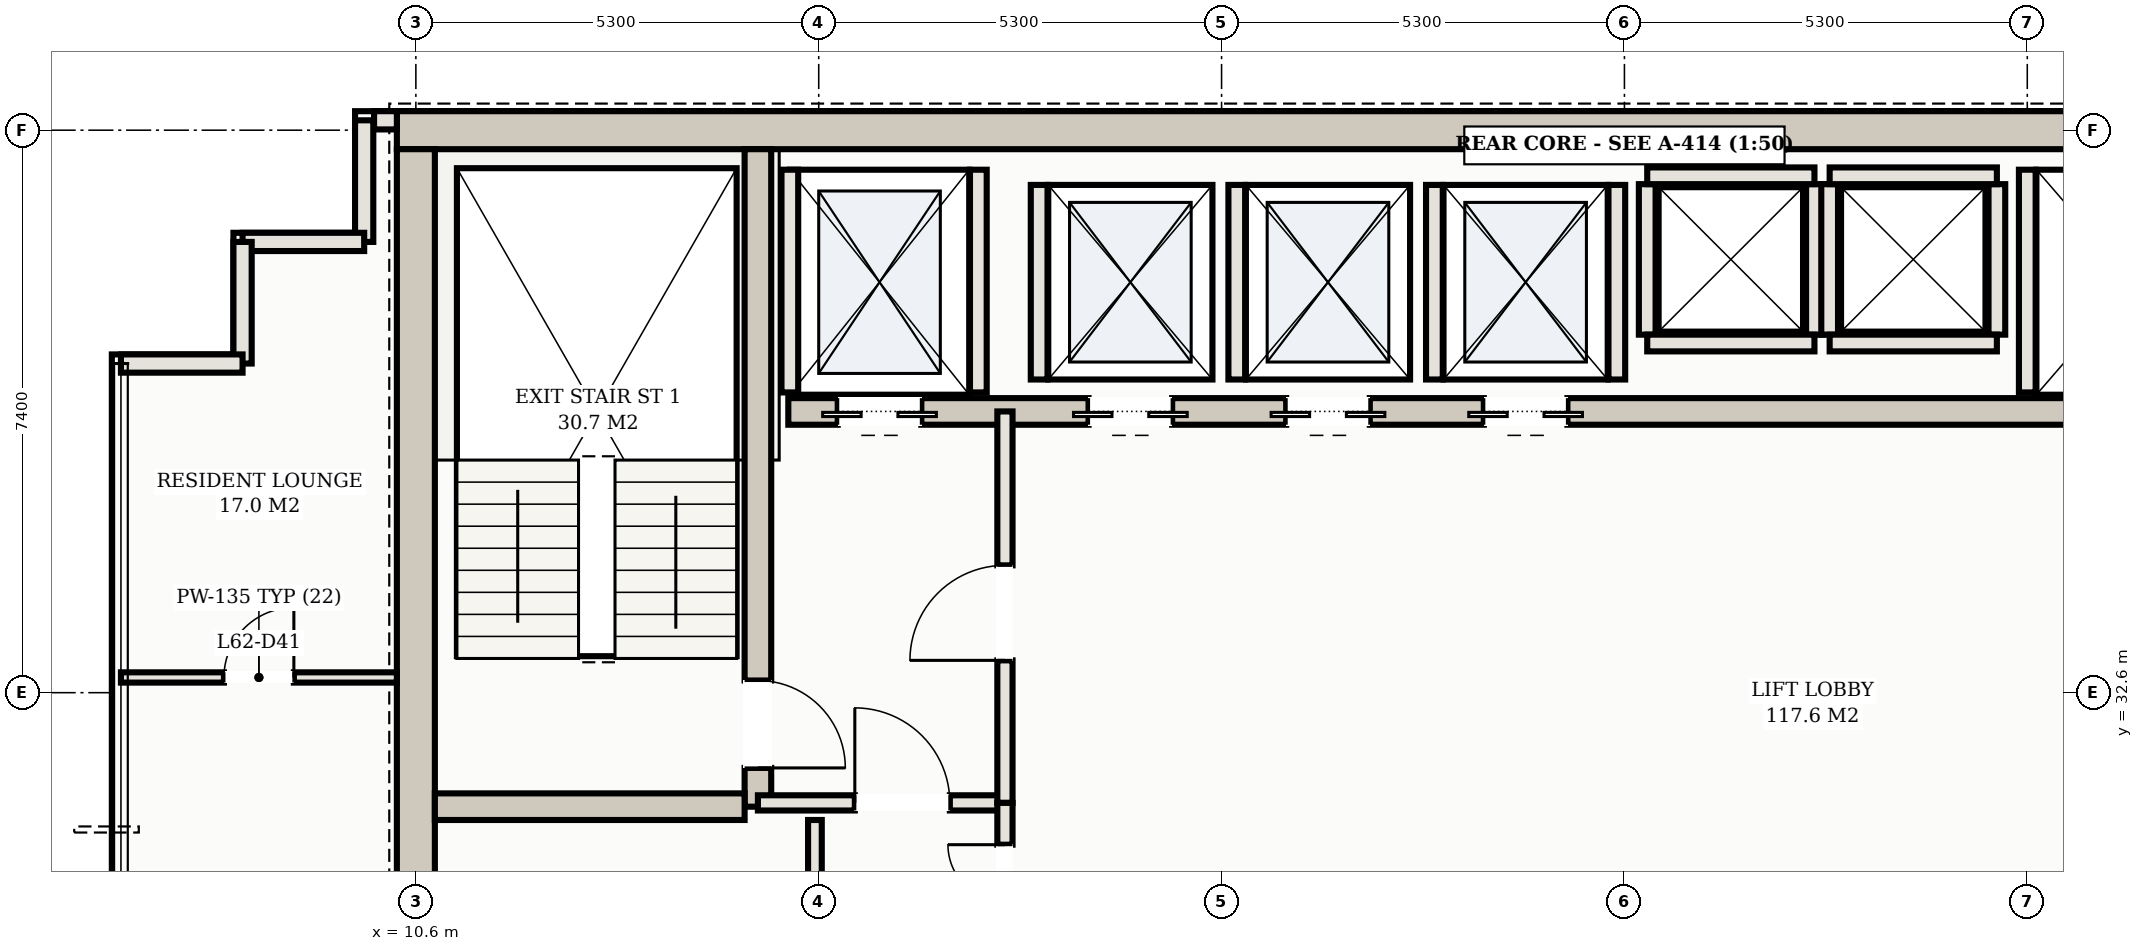
"""IFC4 building model, lengths in metres.
Left out: names, types, materials, properties, quantities, classifications, styles, units other than length and angle.
Written with IfcOpenShell. Run it as: python <this file> out.ifc"""

import sys

from ifc_helpers import new_model, si_unit, direction, frame, frame_2d, origin, place, context, subcontext, project, spatial, rectangle, extrude, element, fill, save


model = new_model("IFC4")
c1 = context("Model", 3, precision=1e-05, world=origin(), true_north=direction((0.0, 1.0)))
c2 = subcontext(c1, "Body", "Model", "MODEL_VIEW")
j1 = project(units=[si_unit("LENGTHUNIT", "METRE"), si_unit("PLANEANGLEUNIT", "RADIAN")], contexts=[c1])
p1 = place(None, origin())
s1 = spatial("IfcSite", under=j1, at=p1, CompositionType="ELEMENT")
p2 = place(p1, origin())
s2 = spatial("IfcBuilding", under=s1, at=p2, CompositionType="ELEMENT")
p3 = place(p2, frame((0.0, 0.0, 226.4)))
s3 = spatial("IfcBuildingStorey", under=s2, at=p3, CompositionType="ELEMENT", Elevation=226.4)
p4 = place(p3, frame((10.35, 40.0, 0.0), z_axis=(0.0, 0.0, 1.0), x_axis=(1.0, 0.0, 0.0)))
e1 = element("IfcWall", 1, at=p4, inside=s3, PredefinedType="SHEAR", context=c2, shape_type="SweptSolid", body=[
    extrude(rectangle(XDim=32.3, YDim=0.5, at=frame_2d((16.15, 0.0))), origin(), (0.0, 0.0, 1.0), 3.11),
])
p5 = place(p3, frame((10.6, 25.45, 0.0), z_axis=(0.0, 0.0, 1.0), x_axis=(0.0, 1.0, 0.0)))
e2 = element("IfcWall", 2, at=p5, inside=s3, PredefinedType="SHEAR", context=c2, shape_type="SweptSolid", body=[
    extrude(rectangle(XDim=14.3, YDim=0.5, at=frame_2d((7.15, 0.0))), origin(), (0.0, 0.0, 1.0), 3.11),
])
p6 = place(p3, frame((15.1, 31.1, 0.0), z_axis=(0.0, 0.0, 1.0), x_axis=(0.0, 1.0, 0.0)))
e3 = element("IfcWall", 3, at=p6, inside=s3, PredefinedType="SHEAR", context=c2, shape_type="SweptSolid", body=[
    extrude(rectangle(XDim=8.65, YDim=0.35, at=frame_2d((4.325, 0.0))), origin(), (0.0, 0.0, 1.0), 3.11),
])
p7 = place(p6, frame((0.51, 0.0, 0.0)))
e4 = element("IfcOpeningElement", 4, at=p7, cuts=e3, PredefinedType="OPENING", context=c2, shape_type="SweptSolid", body=[
    extrude(rectangle(XDim=1.15, YDim=2.2, at=frame_2d((0.575, 1.1))), frame((0.0, 0.185, 0.0), z_axis=(0.0, -1.0, 0.0), x_axis=(1.0, 0.0, 0.0)), (0.0, 0.0, 1.0), 0.37),
])
p8 = place(p3, frame((10.85, 31.1, 0.0), z_axis=(0.0, 0.0, 1.0), x_axis=(1.0, 0.0, 0.0)))
e5 = element("IfcWall", 5, at=p8, inside=s3, PredefinedType="SHEAR", context=c2, shape_type="SweptSolid", body=[
    extrude(rectangle(XDim=4.075, YDim=0.35, at=frame_2d((2.038, 0.0))), origin(), (0.0, 0.0, 1.0), 3.11),
])
p9 = place(p3, frame((15.5, 36.3, 0.0), z_axis=(0.0, 0.0, 1.0), x_axis=(1.0, 0.0, 0.0)))
e6 = element("IfcWall", 6, at=p9, inside=s3, PredefinedType="SHEAR", context=c2, shape_type="SweptSolid", body=[
    extrude(rectangle(XDim=22.0, YDim=0.35, at=frame_2d((11.0, 0.0))), origin(), (0.0, 0.0, 1.0), 3.11),
])
p10 = place(p9, frame((0.65, 0.0, 0.0)))
e7 = element("IfcOpeningElement", 7, at=p10, cuts=e6, PredefinedType="OPENING", context=c2, shape_type="SweptSolid", body=[
    extrude(rectangle(XDim=1.1, YDim=2.15, at=frame_2d((0.55, 1.075))), frame((0.0, 0.185, 0.0), z_axis=(0.0, -1.0, 0.0), x_axis=(1.0, 0.0, 0.0)), (0.0, 0.0, 1.0), 0.37),
])
p11 = place(p9, frame((20.25, 0.0, 0.0)))
e8 = element("IfcOpeningElement", 8, at=p11, cuts=e6, PredefinedType="OPENING", context=c2, shape_type="SweptSolid", body=[
    extrude(rectangle(XDim=1.1, YDim=2.15, at=frame_2d((0.55, 1.075))), frame((0.0, 0.185, 0.0), z_axis=(0.0, -1.0, 0.0), x_axis=(1.0, 0.0, 0.0)), (0.0, 0.0, 1.0), 0.37),
])
p12 = place(p9, frame((17.05, 0.0, 0.0)))
e9 = element("IfcOpeningElement", 9, at=p12, cuts=e6, PredefinedType="OPENING", context=c2, shape_type="SweptSolid", body=[
    extrude(rectangle(XDim=1.3, YDim=2.2, at=frame_2d((0.65, 1.1))), frame((0.0, 0.185, 0.0), z_axis=(0.0, -1.0, 0.0), x_axis=(1.0, 0.0, 0.0)), (0.0, 0.0, 1.0), 0.37),
])
p13 = place(p9, frame((3.95, 0.0, 0.0)))
e10 = element("IfcOpeningElement", 10, at=p13, cuts=e6, PredefinedType="OPENING", context=c2, shape_type="SweptSolid", body=[
    extrude(rectangle(XDim=1.1, YDim=2.15, at=frame_2d((0.55, 1.075))), frame((0.0, 0.185, 0.0), z_axis=(0.0, -1.0, 0.0), x_axis=(1.0, 0.0, 0.0)), (0.0, 0.0, 1.0), 0.37),
])
p14 = place(p9, frame((6.55, 0.0, 0.0)))
e11 = element("IfcOpeningElement", 11, at=p14, cuts=e6, PredefinedType="OPENING", context=c2, shape_type="SweptSolid", body=[
    extrude(rectangle(XDim=1.1, YDim=2.15, at=frame_2d((0.55, 1.075))), frame((0.0, 0.185, 0.0), z_axis=(0.0, -1.0, 0.0), x_axis=(1.0, 0.0, 0.0)), (0.0, 0.0, 1.0), 0.37),
])
p15 = place(p9, frame((9.15, 0.0, 0.0)))
e12 = element("IfcOpeningElement", 12, at=p15, cuts=e6, PredefinedType="OPENING", context=c2, shape_type="SweptSolid", body=[
    extrude(rectangle(XDim=1.1, YDim=2.15, at=frame_2d((0.55, 1.075))), frame((0.0, 0.185, 0.0), z_axis=(0.0, -1.0, 0.0), x_axis=(1.0, 0.0, 0.0)), (0.0, 0.0, 1.0), 0.37),
])
for number, where, z_axis, x_axis in (
    (13, (15.52, 36.55, 0.0), (0.0, 0.0, 1.0), (0.0, 1.0, 0.0)),
    (14, (18.0, 36.55, 0.0), (0.0, 0.0, 1.0), (0.0, 1.0, 0.0)),
    (15, (31.8, 36.55, 0.0), (0.0, 0.0, 1.0), (0.0, 1.0, 0.0)),
):
    element("IfcWall", number, at=place(p3, frame(where, z_axis=z_axis, x_axis=x_axis)), inside=s3, PredefinedType="SOLIDWALL", context=c2, shape_type="SweptSolid", body=[
        extrude(rectangle(XDim=2.93, YDim=0.22, at=frame_2d((1.465, 0.0))), origin(), (0.0, 0.0, 1.0), 3.11),
    ])
for number, where, z_axis, x_axis in (
    (16, (18.8, 36.72, 0.0), (0.0, 0.0, 1.0), (0.0, 1.0, 0.0)),
    (17, (21.4, 36.72, 0.0), (0.0, 0.0, 1.0), (0.0, 1.0, 0.0)),
    (18, (24.0, 36.72, 0.0), (0.0, 0.0, 1.0), (0.0, 1.0, 0.0)),
    (19, (26.4, 36.72, 0.0), (0.0, 0.0, 1.0), (0.0, 1.0, 0.0)),
):
    element("IfcWall", number, at=place(p3, frame(where, z_axis=z_axis, x_axis=x_axis)), inside=s3, PredefinedType="SOLIDWALL", context=c2, shape_type="SweptSolid", body=[
        extrude(rectangle(XDim=2.56, YDim=0.22, at=frame_2d((1.28, 0.0))), origin(), (0.0, 0.0, 1.0), 3.11),
    ])
for number, where, z_axis, x_axis in (
    (20, (26.8, 37.31, 0.0), (0.0, 0.0, 1.0), (0.0, 1.0, 0.0)),
    (21, (29.0, 37.31, 0.0), (0.0, 0.0, 1.0), (0.0, 1.0, 0.0)),
):
    element("IfcWall", number, at=place(p3, frame(where, z_axis=z_axis, x_axis=x_axis)), inside=s3, PredefinedType="SOLIDWALL", context=c2, shape_type="SweptSolid", body=[
        extrude(rectangle(XDim=1.98, YDim=0.22, at=frame_2d((0.99, 0.0))), origin(), (0.0, 0.0, 1.0), 3.11),
    ])
for number, where, z_axis, x_axis in (
    (22, (26.8, 39.4, 0.0), (0.0, 0.0, 1.0), (1.0, 0.0, 0.0)),
    (23, (26.8, 37.2, 0.0), (0.0, 0.0, 1.0), (1.0, 0.0, 0.0)),
):
    element("IfcWall", number, at=place(p3, frame(where, z_axis=z_axis, x_axis=x_axis)), inside=s3, PredefinedType="SOLIDWALL", context=c2, shape_type="SweptSolid", body=[
        extrude(rectangle(XDim=2.2, YDim=0.22, at=frame_2d((1.1, 0.0))), origin(), (0.0, 0.0, 1.0), 3.11),
    ])
for number, where, z_axis, x_axis in (
    (24, (29.2, 37.31, 0.0), (0.0, 0.0, 1.0), (0.0, 1.0, 0.0)),
    (25, (31.4, 37.31, 0.0), (0.0, 0.0, 1.0), (0.0, 1.0, 0.0)),
):
    element("IfcWall", number, at=place(p3, frame(where, z_axis=z_axis, x_axis=x_axis)), inside=s3, PredefinedType="SOLIDWALL", context=c2, shape_type="SweptSolid", body=[
        extrude(rectangle(XDim=1.98, YDim=0.22, at=frame_2d((0.99, 0.0))), origin(), (0.0, 0.0, 1.0), 3.11),
    ])
for number, where, z_axis, x_axis in (
    (26, (29.2, 39.4, 0.0), (0.0, 0.0, 1.0), (1.0, 0.0, 0.0)),
    (27, (29.2, 37.2, 0.0), (0.0, 0.0, 1.0), (1.0, 0.0, 0.0)),
):
    element("IfcWall", number, at=place(p3, frame(where, z_axis=z_axis, x_axis=x_axis)), inside=s3, PredefinedType="SOLIDWALL", context=c2, shape_type="SweptSolid", body=[
        extrude(rectangle(XDim=2.2, YDim=0.22, at=frame_2d((1.1, 0.0))), origin(), (0.0, 0.0, 1.0), 3.11),
    ])
p16 = place(p3, frame((10.35, 40.13, 0.0), z_axis=(0.0, 0.0, 1.0), x_axis=(-1.0, 0.0, 0.0)))
e28 = element("IfcWall", 28, at=p16, inside=s3, PredefinedType="SOLIDWALL", context=c2, shape_type="SweptSolid", body=[
    extrude(rectangle(XDim=0.3, YDim=0.24, at=frame_2d((0.15, 0.0))), origin(), (0.0, 0.0, 1.0), 3.11),
])
for number, where, z_axis, x_axis in (
    (29, (9.92, 40.13, 0.0), (0.0, 0.0, 1.0), (0.0, -1.0, 0.0)),
    (30, (9.92, 38.53, 0.0), (0.0, 0.0, 1.0), (-1.0, 0.0, 0.0)),
):
    element("IfcWall", number, at=place(p3, frame(where, z_axis=z_axis, x_axis=x_axis)), inside=s3, PredefinedType="SOLIDWALL", context=c2, shape_type="SweptSolid", body=[
        extrude(rectangle(XDim=1.6, YDim=0.24, at=frame_2d((0.8, 0.0))), origin(), (0.0, 0.0, 1.0), 3.11),
    ])
for number, where, z_axis, x_axis in (
    (31, (8.32, 38.53, 0.0), (0.0, 0.0, 1.0), (0.0, -1.0, 0.0)),
    (32, (8.32, 36.93, 0.0), (0.0, 0.0, 1.0), (-1.0, 0.0, 0.0)),
):
    element("IfcWall", number, at=place(p3, frame(where, z_axis=z_axis, x_axis=x_axis)), inside=s3, PredefinedType="SOLIDWALL", context=c2, shape_type="SweptSolid", body=[
        extrude(rectangle(XDim=1.6, YDim=0.24, at=frame_2d((0.8, 0.0))), origin(), (0.0, 0.0, 1.0), 3.11),
    ])
p17 = place(p3, frame((15.1, 31.15, 0.0), z_axis=(0.0, 0.0, 1.0), x_axis=(1.0, 0.0, 0.0)))
e33 = element("IfcWall", 33, at=p17, inside=s3, PredefinedType="PARTITIONING", context=c2, shape_type="SweptSolid", body=[
    extrude(rectangle(XDim=3.25, YDim=0.2, at=frame_2d((1.625, 0.0))), origin(), (0.0, 0.0, 1.0), 2.43),
])
p18 = place(p17, frame((1.275, 0.0, 0.0)))
e34 = element("IfcOpeningElement", 34, at=p18, cuts=e33, PredefinedType="OPENING", context=c2, shape_type="SweptSolid", body=[
    extrude(rectangle(XDim=1.25, YDim=2.2, at=frame_2d((0.625, 1.1))), frame((0.0, 0.11, 0.0), z_axis=(0.0, -1.0, 0.0), x_axis=(1.0, 0.0, 0.0)), (0.0, 0.0, 1.0), 0.22),
])
p19 = place(p3, frame((18.35, 31.15, 0.0), z_axis=(0.0, 0.0, 1.0), x_axis=(0.0, 1.0, 0.0)))
e35 = element("IfcWall", 35, at=p19, inside=s3, PredefinedType="PARTITIONING", context=c2, shape_type="SweptSolid", body=[
    extrude(rectangle(XDim=5.15, YDim=0.2, at=frame_2d((2.575, 0.0))), origin(), (0.0, 0.0, 1.0), 2.43),
])
p20 = place(p19, frame((1.875, 0.0, 0.0)))
e36 = element("IfcOpeningElement", 36, at=p20, cuts=e35, PredefinedType="OPENING", context=c2, shape_type="SweptSolid", body=[
    extrude(rectangle(XDim=1.25, YDim=2.2, at=frame_2d((0.625, 1.1))), frame((0.0, 0.11, 0.0), z_axis=(0.0, -1.0, 0.0), x_axis=(1.0, 0.0, 0.0)), (0.0, 0.0, 1.0), 0.22),
])
p21 = place(p3, frame((15.85, 25.45, 0.0), z_axis=(0.0, 0.0, 1.0), x_axis=(0.0, 1.0, 0.0)))
e37 = element("IfcWall", 37, at=p21, inside=s3, PredefinedType="PARTITIONING", context=c2, shape_type="SweptSolid", body=[
    extrude(rectangle(XDim=5.475, YDim=0.18, at=frame_2d((2.738, 0.0))), origin(), (0.0, 0.0, 1.0), 2.43),
])
p22 = place(p21, frame((2.277, 0.0, 0.0)))
e38 = element("IfcOpeningElement", 38, at=p22, cuts=e37, PredefinedType="OPENING", context=c2, shape_type="SweptSolid", body=[
    extrude(rectangle(XDim=0.92, YDim=2.15, at=frame_2d((0.46, 1.075))), frame((0.0, 0.1, 0.0), z_axis=(0.0, -1.0, 0.0), x_axis=(1.0, 0.0, 0.0)), (0.0, 0.0, 1.0), 0.2),
])
p23 = place(p3, frame((18.35, 28.55, 0.0), z_axis=(0.0, 0.0, 1.0), x_axis=(0.0, 1.0, 0.0)))
e39 = element("IfcWall", 39, at=p23, inside=s3, PredefinedType="PARTITIONING", context=c2, shape_type="SweptSolid", body=[
    extrude(rectangle(XDim=2.6, YDim=0.2, at=frame_2d((1.3, 0.0))), origin(), (0.0, 0.0, 1.0), 2.43),
])
p24 = place(p23, frame((0.55, 0.0, 0.0)))
e40 = element("IfcOpeningElement", 40, at=p24, cuts=e39, PredefinedType="OPENING", context=c2, shape_type="SweptSolid", body=[
    extrude(rectangle(XDim=1.5, YDim=2.25, at=frame_2d((0.75, 1.125))), frame((0.0, 0.11, 0.0), z_axis=(0.0, -1.0, 0.0), x_axis=(1.0, 0.0, 0.0)), (0.0, 0.0, 1.0), 0.22),
])
p25 = place(p3, frame((6.72, 32.8, 0.0), z_axis=(0.0, 0.0, 1.0), x_axis=(1.0, 0.0, 0.0)))
e41 = element("IfcWall", 41, at=p25, inside=s3, PredefinedType="PARTITIONING", context=c2, shape_type="SweptSolid", body=[
    extrude(rectangle(XDim=3.63, YDim=0.135, at=frame_2d((1.815, 0.0))), origin(), (0.0, 0.0, 1.0), 2.43),
])
p26 = place(p25, frame((1.355, 0.0, 0.0)))
e42 = element("IfcOpeningElement", 42, at=p26, cuts=e41, PredefinedType="OPENING", context=c2, shape_type="SweptSolid", body=[
    extrude(rectangle(XDim=0.92, YDim=2.15, at=frame_2d((0.46, 1.075))), frame((0.0, 0.078, 0.0), z_axis=(0.0, -1.0, 0.0), x_axis=(1.0, 0.0, 0.0)), (0.0, 0.0, 1.0), 0.155),
])
p27 = place(p10, frame((1.1, 0.0, 0.0), z_axis=(0.0, 0.0, 1.0), x_axis=(-1.0, 0.0, 0.0)))
e43 = element("IfcDoor", 43, at=p27, inside=s3, OperationType="DOUBLE_DOOR_SLIDING", PredefinedType="DOOR", context=c2, shape_type="SweptSolid", body=[
    extrude(rectangle(XDim=1.1, YDim=2.15, at=frame_2d((0.55, 1.075))), frame((0.0, 0.025, 0.0), z_axis=(0.0, -1.0, 0.0), x_axis=(1.0, 0.0, 0.0)), (0.0, 0.0, 1.0), 0.05),
])
fill(e7, e43)
p28 = place(p13, frame((1.1, 0.0, 0.0), z_axis=(0.0, 0.0, 1.0), x_axis=(-1.0, 0.0, 0.0)))
e44 = element("IfcDoor", 44, at=p28, inside=s3, OperationType="DOUBLE_DOOR_SLIDING", PredefinedType="DOOR", context=c2, shape_type="SweptSolid", body=[
    extrude(rectangle(XDim=1.1, YDim=2.15, at=frame_2d((0.55, 1.075))), frame((0.0, 0.025, 0.0), z_axis=(0.0, -1.0, 0.0), x_axis=(1.0, 0.0, 0.0)), (0.0, 0.0, 1.0), 0.05),
])
fill(e10, e44)
p29 = place(p14, frame((1.1, 0.0, 0.0), z_axis=(0.0, 0.0, 1.0), x_axis=(-1.0, 0.0, 0.0)))
e45 = element("IfcDoor", 45, at=p29, inside=s3, OperationType="DOUBLE_DOOR_SLIDING", PredefinedType="DOOR", context=c2, shape_type="SweptSolid", body=[
    extrude(rectangle(XDim=1.1, YDim=2.15, at=frame_2d((0.55, 1.075))), frame((0.0, 0.025, 0.0), z_axis=(0.0, -1.0, 0.0), x_axis=(1.0, 0.0, 0.0)), (0.0, 0.0, 1.0), 0.05),
])
fill(e11, e45)
p30 = place(p15, frame((1.1, 0.0, 0.0), z_axis=(0.0, 0.0, 1.0), x_axis=(-1.0, 0.0, 0.0)))
e46 = element("IfcDoor", 46, at=p30, inside=s3, OperationType="DOUBLE_DOOR_SLIDING", PredefinedType="DOOR", context=c2, shape_type="SweptSolid", body=[
    extrude(rectangle(XDim=1.1, YDim=2.15, at=frame_2d((0.55, 1.075))), frame((0.0, 0.025, 0.0), z_axis=(0.0, -1.0, 0.0), x_axis=(1.0, 0.0, 0.0)), (0.0, 0.0, 1.0), 0.05),
])
fill(e12, e46)
p31 = place(p18, origin())
e47 = element("IfcDoor", 47, at=p31, inside=s3, OperationType="SINGLE_SWING_LEFT", PredefinedType="DOOR", context=c2, shape_type="SweptSolid", body=[
    extrude(rectangle(XDim=1.25, YDim=2.2, at=frame_2d((0.625, 1.1))), frame((0.0, 0.025, 0.0), z_axis=(0.0, -1.0, 0.0), x_axis=(1.0, 0.0, 0.0)), (0.0, 0.0, 1.0), 0.05),
])
fill(e34, e47)
p32 = place(p20, origin())
e48 = element("IfcDoor", 48, at=p32, inside=s3, OperationType="SINGLE_SWING_LEFT", PredefinedType="DOOR", context=c2, shape_type="SweptSolid", body=[
    extrude(rectangle(XDim=1.25, YDim=2.2, at=frame_2d((0.625, 1.1))), frame((0.0, 0.025, 0.0), z_axis=(0.0, -1.0, 0.0), x_axis=(1.0, 0.0, 0.0)), (0.0, 0.0, 1.0), 0.05),
])
fill(e36, e48)
p33 = place(p7, frame((1.15, 0.0, 0.0), z_axis=(0.0, 0.0, 1.0), x_axis=(-1.0, 0.0, 0.0)))
e49 = element("IfcDoor", 49, at=p33, inside=s3, OperationType="SINGLE_SWING_RIGHT", PredefinedType="DOOR", context=c2, shape_type="SweptSolid", body=[
    extrude(rectangle(XDim=1.15, YDim=2.2, at=frame_2d((0.575, 1.1))), frame((0.0, 0.025, 0.0), z_axis=(0.0, -1.0, 0.0), x_axis=(1.0, 0.0, 0.0)), (0.0, 0.0, 1.0), 0.05),
])
fill(e4, e49)
p34 = place(p24, origin())
e50 = element("IfcDoor", 50, at=p34, inside=s3, OperationType="DOUBLE_DOOR_SINGLE_SWING", PredefinedType="DOOR", context=c2, shape_type="SweptSolid", body=[
    extrude(rectangle(XDim=1.5, YDim=2.25, at=frame_2d((0.75, 1.125))), frame((0.0, 0.025, 0.0), z_axis=(0.0, -1.0, 0.0), x_axis=(1.0, 0.0, 0.0)), (0.0, 0.0, 1.0), 0.05),
])
fill(e40, e50)
p35 = place(p26, origin())
e51 = element("IfcDoor", 51, at=p35, inside=s3, OperationType="SINGLE_SWING_RIGHT", PredefinedType="DOOR", context=c2, shape_type="SweptSolid", body=[
    extrude(rectangle(XDim=0.92, YDim=2.15, at=frame_2d((0.46, 1.075))), frame((0.0, 0.025, 0.0), z_axis=(0.0, -1.0, 0.0), x_axis=(1.0, 0.0, 0.0)), (0.0, 0.0, 1.0), 0.05),
])
fill(e42, e51)
save(model, sys.argv[1])
